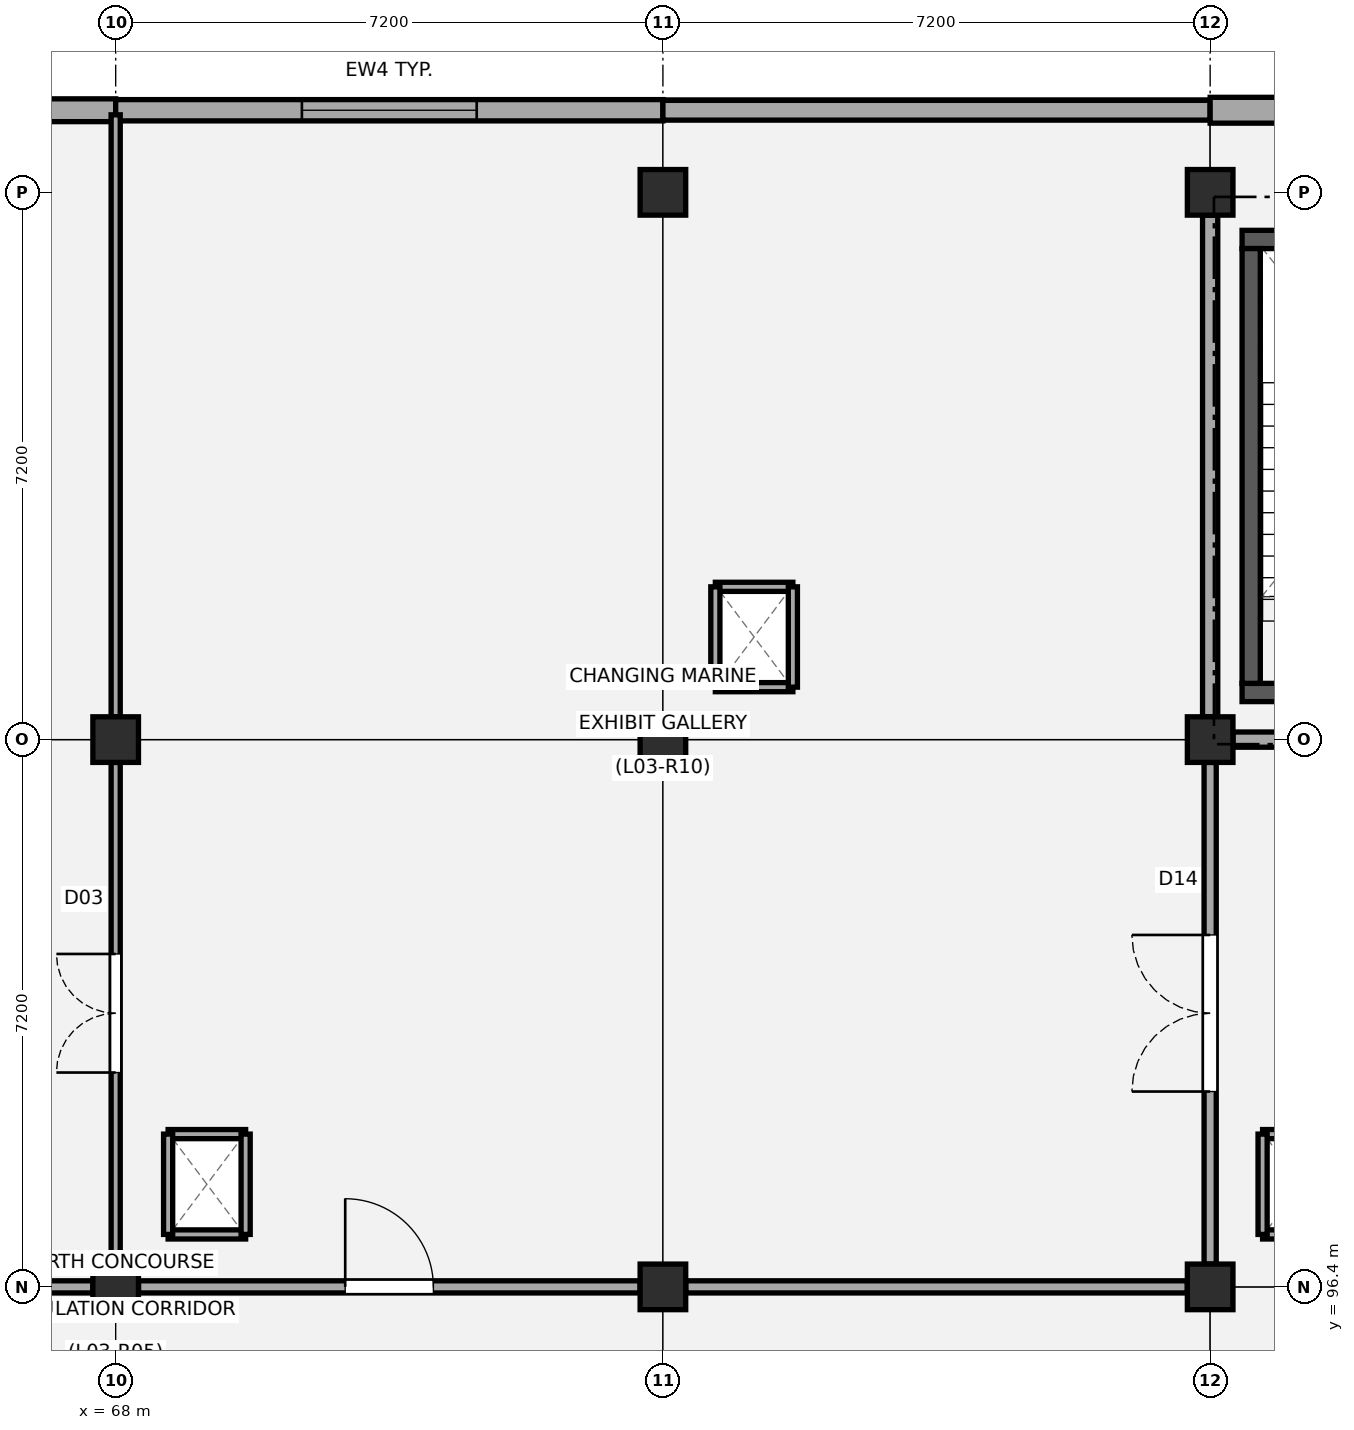
"""IFC4 building model, lengths in metres.
Left out: names, types, materials, properties, quantities, classifications, styles, units other than length and angle.
Written with IfcOpenShell. Run it as: python <this file> out.ifc"""

import sys

from ifc_helpers import new_model, si_unit, direction, frame, frame_2d, origin, origin_2d, place, context, subcontext, project, spatial, rectangle, extrude, element, fill, save


model = new_model("IFC4")
c1 = context("Model", 3, precision=1e-05, world=origin(), true_north=direction((0.0, 1.0)))
c2 = subcontext(c1, "Body", "Model", "MODEL_VIEW")
j1 = project(units=[si_unit("LENGTHUNIT", "METRE"), si_unit("PLANEANGLEUNIT", "RADIAN")], contexts=[c1])
p1 = place(None, origin())
s1 = spatial("IfcSite", under=j1, at=p1, CompositionType="ELEMENT")
p2 = place(p1, origin())
s2 = spatial("IfcBuilding", under=s1, at=p2, CompositionType="ELEMENT")
p3 = place(p2, frame((0.0, 0.0, 13.5)))
s3 = spatial("IfcBuildingStorey", under=s2, at=p3, CompositionType="ELEMENT", Elevation=13.5)
for number, where, z_axis, x_axis in (
    (1, (68.0, 96.4, 0.0), (0.0, 0.0, 1.0), (1.0, 0.0, 0.0)),
    (2, (68.0, 103.6, 0.0), (0.0, 0.0, 1.0), (1.0, 0.0, 0.0)),
    (3, (75.2, 96.4, 0.0), (0.0, 0.0, 1.0), (1.0, 0.0, 0.0)),
    (4, (75.2, 103.6, 0.0), (0.0, 0.0, 1.0), (1.0, 0.0, 0.0)),
    (5, (75.2, 110.8, 0.0), (0.0, 0.0, 1.0), (1.0, 0.0, 0.0)),
    (6, (82.4, 96.4, 0.0), (0.0, 0.0, 1.0), (1.0, 0.0, 0.0)),
    (7, (82.4, 103.6, 0.0), (0.0, 0.0, 1.0), (1.0, 0.0, 0.0)),
    (8, (82.4, 110.8, 0.0), (0.0, 0.0, 1.0), (1.0, 0.0, 0.0)),
):
    element("IfcColumn", number, at=place(p3, frame(where, z_axis=z_axis, x_axis=x_axis)), inside=s3, PredefinedType="COLUMN", context=c2, shape_type="SweptSolid", body=[
        extrude(rectangle(XDim=0.6, YDim=0.6, at=origin_2d()), origin(), (0.0, 0.0, 1.0), 4.14),
    ])
p4 = place(p3, frame((60.8, 111.88, 0.0), z_axis=(0.0, 0.0, 1.0), x_axis=(1.0, 0.0, 0.0)))
e9 = element("IfcWall", 9, at=p4, inside=s3, PredefinedType="STANDARD", context=c2, shape_type="SweptSolid", body=[
    extrude(rectangle(XDim=7.2, YDim=0.3, at=frame_2d((3.6, 0.0))), origin(), (0.0, 0.0, 1.0), 3.85),
])
p5 = place(p3, frame((68.0, 111.88, 0.0), z_axis=(0.0, 0.0, 1.0), x_axis=(1.0, 0.0, 0.0)))
e10 = element("IfcWall", 10, at=p5, inside=s3, PredefinedType="STANDARD", context=c2, shape_type="SweptSolid", body=[
    extrude(rectangle(XDim=7.2, YDim=0.28, at=frame_2d((3.6, 0.0))), origin(), (0.0, 0.0, 1.0), 3.87),
])
p6 = place(p5, frame((2.45, 0.0, 0.95)))
e11 = element("IfcOpeningElement", 11, at=p6, cuts=e10, PredefinedType="OPENING", context=c2, shape_type="SweptSolid", body=[
    extrude(rectangle(XDim=2.3, YDim=1.5, at=frame_2d((1.15, 0.75))), frame((0.0, 0.15, 0.0), z_axis=(0.0, -1.0, 0.0), x_axis=(1.0, 0.0, 0.0)), (0.0, 0.0, 1.0), 0.3),
])
p7 = place(p3, frame((75.2, 111.88, 0.0), z_axis=(0.0, 0.0, 1.0), x_axis=(1.0, 0.0, 0.0)))
e12 = element("IfcWall", 12, at=p7, inside=s3, PredefinedType="STANDARD", context=c2, shape_type="SweptSolid", body=[
    extrude(rectangle(XDim=7.2, YDim=0.26, at=frame_2d((3.6, 0.0))), origin(), (0.0, 0.0, 1.0), 3.85),
])
p8 = place(p3, frame((82.4, 111.88, 0.0), z_axis=(0.0, 0.0, 1.0), x_axis=(1.0, 0.0, 0.0)))
e13 = element("IfcWall", 13, at=p8, inside=s3, PredefinedType="STANDARD", context=c2, shape_type="SweptSolid", body=[
    extrude(rectangle(XDim=7.2, YDim=0.34, at=frame_2d((3.6, 0.0))), origin(), (0.0, 0.0, 1.0), 3.87),
])
for number, where, z_axis, x_axis in (
    (14, (82.82, 104.22, 0.0), (0.0, 0.0, 1.0), (1.0, 0.0, 0.0)),
    (15, (82.82, 110.18, 0.0), (0.0, 0.0, 1.0), (1.0, 0.0, 0.0)),
):
    element("IfcWall", number, at=place(p3, frame(where, z_axis=z_axis, x_axis=x_axis)), inside=s3, PredefinedType="SHEAR", context=c2, shape_type="SweptSolid", body=[
        extrude(rectangle(XDim=4.24, YDim=0.24, at=frame_2d((2.12, 0.0))), origin(), (0.0, 0.0, 1.0), 3.88),
    ])
p9 = place(p3, frame((82.94, 104.34, 0.0), z_axis=(0.0, 0.0, 1.0), x_axis=(0.0, 1.0, 0.0)))
e16 = element("IfcWall", 16, at=p9, inside=s3, PredefinedType="SHEAR", context=c2, shape_type="SweptSolid", body=[
    extrude(rectangle(XDim=5.72, YDim=0.24, at=frame_2d((2.86, 0.0))), origin(), (0.0, 0.0, 1.0), 3.88),
])
p10 = place(p3, frame((82.4, 103.9, 0.0), z_axis=(0.0, 0.0, 1.0), x_axis=(0.0, 1.0, 0.0)))
e17 = element("IfcWall", 17, at=p10, inside=s3, PredefinedType="PARTITIONING", context=c2, shape_type="SweptSolid", body=[
    extrude(rectangle(XDim=6.6, YDim=0.2, at=frame_2d((3.3, 0.0))), origin(), (0.0, 0.0, 1.0), 3.2),
])
p11 = place(p3, frame((82.7, 103.6, 0.0), z_axis=(0.0, 0.0, 1.0), x_axis=(1.0, 0.0, 0.0)))
e18 = element("IfcWall", 18, at=p11, inside=s3, PredefinedType="PARTITIONING", context=c2, shape_type="SweptSolid", body=[
    extrude(rectangle(XDim=4.24, YDim=0.2, at=frame_2d((2.12, 0.0))), origin(), (0.0, 0.0, 1.0), 3.27),
])
for number, where, z_axis, x_axis in (
    (19, (68.69, 97.09, 0.0), (0.0, 0.0, 1.0), (1.0, 0.0, 0.0)),
    (20, (68.69, 98.41, 0.0), (0.0, 0.0, 1.0), (1.0, 0.0, 0.0)),
):
    element("IfcWall", number, at=place(p3, frame(where, z_axis=z_axis, x_axis=x_axis)), inside=s3, PredefinedType="PARTITIONING", context=c2, shape_type="SweptSolid", body=[
        extrude(rectangle(XDim=1.02, YDim=0.12, at=frame_2d((0.51, 0.0))), origin(), (0.0, 0.0, 1.0), 3.86),
    ])
for number, where, z_axis, x_axis in (
    (21, (68.69, 97.09, 0.0), (0.0, 0.0, 1.0), (0.0, 1.0, 0.0)),
    (22, (69.71, 97.09, 0.0), (0.0, 0.0, 1.0), (0.0, 1.0, 0.0)),
):
    element("IfcWall", number, at=place(p3, frame(where, z_axis=z_axis, x_axis=x_axis)), inside=s3, PredefinedType="PARTITIONING", context=c2, shape_type="SweptSolid", body=[
        extrude(rectangle(XDim=1.32, YDim=0.12, at=frame_2d((0.66, 0.0))), origin(), (0.0, 0.0, 1.0), 3.86),
    ])
for number, where, z_axis, x_axis in (
    (23, (75.89, 104.29, 0.0), (0.0, 0.0, 1.0), (1.0, 0.0, 0.0)),
    (24, (75.89, 105.61, 0.0), (0.0, 0.0, 1.0), (1.0, 0.0, 0.0)),
):
    element("IfcWall", number, at=place(p3, frame(where, z_axis=z_axis, x_axis=x_axis)), inside=s3, PredefinedType="PARTITIONING", context=c2, shape_type="SweptSolid", body=[
        extrude(rectangle(XDim=1.02, YDim=0.12, at=frame_2d((0.51, 0.0))), origin(), (0.0, 0.0, 1.0), 3.84),
    ])
for number, where, z_axis, x_axis in (
    (25, (75.89, 104.29, 0.0), (0.0, 0.0, 1.0), (0.0, 1.0, 0.0)),
    (26, (76.91, 104.29, 0.0), (0.0, 0.0, 1.0), (0.0, 1.0, 0.0)),
):
    element("IfcWall", number, at=place(p3, frame(where, z_axis=z_axis, x_axis=x_axis)), inside=s3, PredefinedType="PARTITIONING", context=c2, shape_type="SweptSolid", body=[
        extrude(rectangle(XDim=1.32, YDim=0.12, at=frame_2d((0.66, 0.0))), origin(), (0.0, 0.0, 1.0), 3.84),
    ])
for number, where, z_axis, x_axis in (
    (27, (83.09, 97.09, 0.0), (0.0, 0.0, 1.0), (1.0, 0.0, 0.0)),
    (28, (83.09, 98.41, 0.0), (0.0, 0.0, 1.0), (1.0, 0.0, 0.0)),
):
    element("IfcWall", number, at=place(p3, frame(where, z_axis=z_axis, x_axis=x_axis)), inside=s3, PredefinedType="PARTITIONING", context=c2, shape_type="SweptSolid", body=[
        extrude(rectangle(XDim=1.02, YDim=0.12, at=frame_2d((0.51, 0.0))), origin(), (0.0, 0.0, 1.0), 3.86),
    ])
p12 = place(p3, frame((83.09, 97.09, 0.0), z_axis=(0.0, 0.0, 1.0), x_axis=(0.0, 1.0, 0.0)))
e29 = element("IfcWall", 29, at=p12, inside=s3, PredefinedType="PARTITIONING", context=c2, shape_type="SweptSolid", body=[
    extrude(rectangle(XDim=1.32, YDim=0.12, at=frame_2d((0.66, 0.0))), origin(), (0.0, 0.0, 1.0), 3.86),
])
p13 = place(p3, frame((61.1, 96.4, 0.0), z_axis=(0.0, 0.0, 1.0), x_axis=(1.0, 0.0, 0.0)))
e30 = element("IfcWall", 30, at=p13, inside=s3, PredefinedType="PARTITIONING", context=c2, shape_type="SweptSolid", body=[
    extrude(rectangle(XDim=6.6, YDim=0.16, at=frame_2d((3.3, 0.0))), origin(), (0.0, 0.0, 1.0), 3.25),
])
p14 = place(p13, frame((2.72, 0.0, 0.0)))
e31 = element("IfcOpeningElement", 31, at=p14, cuts=e30, PredefinedType="OPENING", context=c2, shape_type="SweptSolid", body=[
    extrude(rectangle(XDim=1.16, YDim=2.18, at=frame_2d((0.58, 1.09))), frame((0.0, 0.09, 0.0), z_axis=(0.0, -1.0, 0.0), x_axis=(1.0, 0.0, 0.0)), (0.0, 0.0, 1.0), 0.18),
])
p15 = place(p3, frame((68.0, 96.7, 0.0), z_axis=(0.0, 0.0, 1.0), x_axis=(0.0, 1.0, 0.0)))
e32 = element("IfcWall", 32, at=p15, inside=s3, PredefinedType="PARTITIONING", context=c2, shape_type="SweptSolid", body=[
    extrude(rectangle(XDim=6.6, YDim=0.12, at=frame_2d((3.3, 0.0))), origin(), (0.0, 0.0, 1.0), 3.25),
])
p16 = place(p15, frame((2.52, 0.0, 0.0)))
e33 = element("IfcOpeningElement", 33, at=p16, cuts=e32, PredefinedType="OPENING", context=c2, shape_type="SweptSolid", body=[
    extrude(rectangle(XDim=1.56, YDim=2.2, at=frame_2d((0.78, 1.1))), frame((0.0, 0.07, 0.0), z_axis=(0.0, -1.0, 0.0), x_axis=(1.0, 0.0, 0.0)), (0.0, 0.0, 1.0), 0.14),
])
p17 = place(p3, frame((68.0, 103.9, 0.0), z_axis=(0.0, 0.0, 1.0), x_axis=(0.0, 1.0, 0.0)))
e34 = element("IfcWall", 34, at=p17, inside=s3, PredefinedType="PARTITIONING", context=c2, shape_type="SweptSolid", body=[
    extrude(rectangle(XDim=7.92, YDim=0.12, at=frame_2d((3.96, 0.0))), origin(), (0.0, 0.0, 1.0), 3.2),
])
p18 = place(p3, frame((68.3, 96.4, 0.0), z_axis=(0.0, 0.0, 1.0), x_axis=(1.0, 0.0, 0.0)))
e35 = element("IfcWall", 35, at=p18, inside=s3, PredefinedType="PARTITIONING", context=c2, shape_type="SweptSolid", body=[
    extrude(rectangle(XDim=6.6, YDim=0.16, at=frame_2d((3.3, 0.0))), origin(), (0.0, 0.0, 1.0), 3.22),
])
p19 = place(p18, frame((2.72, 0.0, 0.0)))
e36 = element("IfcOpeningElement", 36, at=p19, cuts=e35, PredefinedType="OPENING", context=c2, shape_type="SweptSolid", body=[
    extrude(rectangle(XDim=1.16, YDim=2.18, at=frame_2d((0.58, 1.09))), frame((0.0, 0.09, 0.0), z_axis=(0.0, -1.0, 0.0), x_axis=(1.0, 0.0, 0.0)), (0.0, 0.0, 1.0), 0.18),
])
p20 = place(p3, frame((75.5, 96.4, 0.0), z_axis=(0.0, 0.0, 1.0), x_axis=(1.0, 0.0, 0.0)))
e37 = element("IfcWall", 37, at=p20, inside=s3, PredefinedType="PARTITIONING", context=c2, shape_type="SweptSolid", body=[
    extrude(rectangle(XDim=6.6, YDim=0.16, at=frame_2d((3.3, 0.0))), origin(), (0.0, 0.0, 1.0), 3.25),
])
p21 = place(p3, frame((82.4, 96.7, 0.0), z_axis=(0.0, 0.0, 1.0), x_axis=(0.0, 1.0, 0.0)))
e38 = element("IfcWall", 38, at=p21, inside=s3, PredefinedType="PARTITIONING", context=c2, shape_type="SweptSolid", body=[
    extrude(rectangle(XDim=6.6, YDim=0.16, at=frame_2d((3.3, 0.0))), origin(), (0.0, 0.0, 1.0), 3.25),
])
p22 = place(p21, frame((2.27, 0.0, 0.0)))
e39 = element("IfcOpeningElement", 39, at=p22, cuts=e38, PredefinedType="OPENING", context=c2, shape_type="SweptSolid", body=[
    extrude(rectangle(XDim=2.06, YDim=2.28, at=frame_2d((1.03, 1.14))), frame((0.0, 0.09, 0.0), z_axis=(0.0, -1.0, 0.0), x_axis=(1.0, 0.0, 0.0)), (0.0, 0.0, 1.0), 0.18),
])
p23 = place(p6, origin())
e40 = element("IfcWindow", 40, at=p23, inside=s3, PartitioningType="SINGLE_PANEL", PredefinedType="WINDOW", context=c2, shape_type="SweptSolid", body=[
    extrude(rectangle(XDim=2.3, YDim=1.5, at=frame_2d((1.15, 0.75))), frame((0.0, 0.03, 0.0), z_axis=(0.0, -1.0, 0.0), x_axis=(1.0, 0.0, 0.0)), (0.0, 0.0, 1.0), 0.06),
])
fill(e11, e40)
p24 = place(p19, origin())
e41 = element("IfcDoor", 41, at=p24, inside=s3, OperationType="SINGLE_SWING_LEFT", PredefinedType="DOOR", context=c2, shape_type="SweptSolid", body=[
    extrude(rectangle(XDim=1.16, YDim=2.18, at=frame_2d((0.58, 1.09))), frame((0.0, 0.025, 0.0), z_axis=(0.0, -1.0, 0.0), x_axis=(1.0, 0.0, 0.0)), (0.0, 0.0, 1.0), 0.05),
])
fill(e36, e41)
p25 = place(p22, origin())
e42 = element("IfcDoor", 42, at=p25, inside=s3, OperationType="DOUBLE_DOOR_SINGLE_SWING", PredefinedType="DOOR", context=c2, shape_type="SweptSolid", body=[
    extrude(rectangle(XDim=2.06, YDim=2.28, at=frame_2d((1.03, 1.14))), frame((0.0, 0.025, 0.0), z_axis=(0.0, -1.0, 0.0), x_axis=(1.0, 0.0, 0.0)), (0.0, 0.0, 1.0), 0.05),
])
fill(e39, e42)
p26 = place(p16, origin())
e43 = element("IfcDoor", 43, at=p26, inside=s3, OperationType="DOUBLE_DOOR_SINGLE_SWING", PredefinedType="DOOR", context=c2, shape_type="SweptSolid", body=[
    extrude(rectangle(XDim=1.56, YDim=2.2, at=frame_2d((0.78, 1.1))), frame((0.0, 0.025, 0.0), z_axis=(0.0, -1.0, 0.0), x_axis=(1.0, 0.0, 0.0)), (0.0, 0.0, 1.0), 0.05),
])
fill(e33, e43)
save(model, sys.argv[1])
